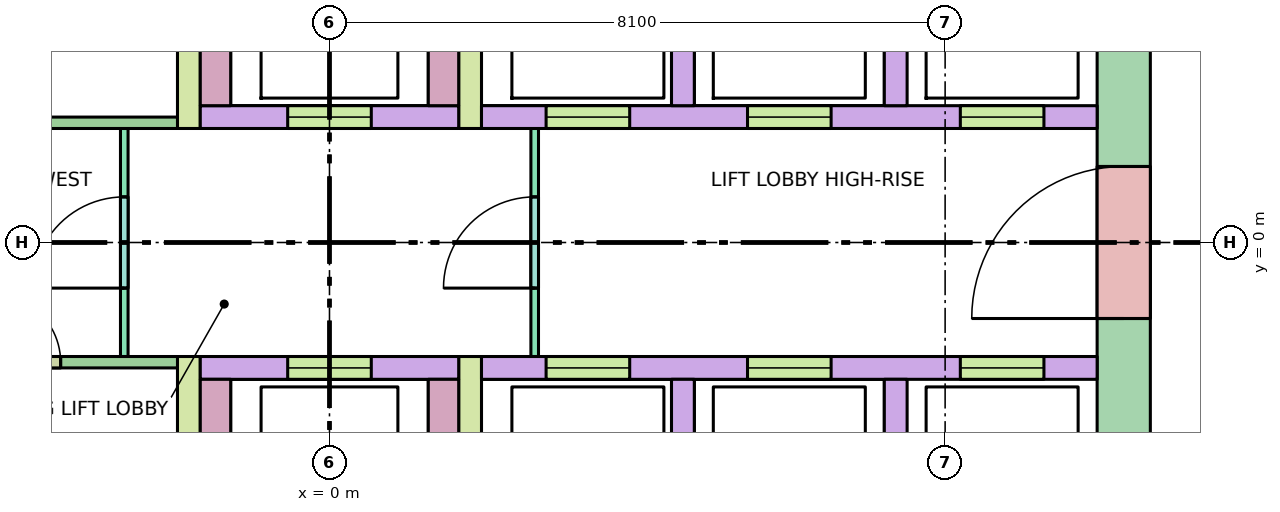
"""IFC4 building model, lengths in metres.
Left out: names, types, materials, properties, quantities, classifications, styles, units other than length and angle.
Written with IfcOpenShell. Run it as: python <this file> out.ifc"""

import sys

from ifc_helpers import new_model, si_unit, direction, frame, frame_2d, origin, place, context, subcontext, project, spatial, rectangle, extrude, element, fill, save


model = new_model("IFC4")
c1 = context("Model", 3, precision=1e-05, world=origin(), true_north=direction((0.0, 1.0)))
c2 = subcontext(c1, "Body", "Model", "MODEL_VIEW")
j1 = project(units=[si_unit("LENGTHUNIT", "METRE"), si_unit("PLANEANGLEUNIT", "RADIAN")], contexts=[c1])
p1 = place(None, origin())
s1 = spatial("IfcSite", under=j1, at=p1, CompositionType="ELEMENT")
p2 = place(p1, origin())
s2 = spatial("IfcBuilding", under=s1, at=p2, CompositionType="ELEMENT")
p3 = place(p2, frame((0.0, 0.0, 165.3)))
s3 = spatial("IfcBuildingStorey", under=s2, at=p3, CompositionType="ELEMENT", Elevation=165.3)
p4 = place(p3, frame((10.45, -5.13, -0.28), z_axis=(0.0, 0.0, 1.0), x_axis=(0.0, 1.0, 0.0)))
e1 = element("IfcWall", 1, at=p4, inside=s3, PredefinedType="SHEAR", context=c2, shape_type="SweptSolid", body=[
    extrude(rectangle(XDim=10.26, YDim=0.7, at=frame_2d((5.13, 0.0))), origin(), (0.0, 0.0, 1.0), 3.7),
])
p5 = place(p4, frame((4.13, 0.0, 0.28)))
e2 = element("IfcOpeningElement", 2, at=p5, cuts=e1, PredefinedType="OPENING", context=c2, shape_type="SweptSolid", body=[
    extrude(rectangle(XDim=2.0, YDim=2.1, at=frame_2d((1.0, 1.05))), frame((0.0, 0.36, 0.0), z_axis=(0.0, -1.0, 0.0), x_axis=(1.0, 0.0, 0.0)), (0.0, 0.0, 1.0), 0.72),
])
p6 = place(p3, frame((2.0, 1.65, 0.0), z_axis=(0.0, 0.0, 1.0), x_axis=(1.0, 0.0, 0.0)))
e3 = element("IfcWall", 3, at=p6, inside=s3, PredefinedType="SOLIDWALL", context=c2, shape_type="SweptSolid", body=[
    extrude(rectangle(XDim=8.1, YDim=0.3, at=frame_2d((4.05, 0.0))), origin(), (0.0, 0.0, 1.0), 3.42),
])
p7 = place(p6, frame((0.85, 0.0, 0.0)))
e4 = element("IfcOpeningElement", 4, at=p7, cuts=e3, PredefinedType="OPENING", context=c2, shape_type="SweptSolid", body=[
    extrude(rectangle(XDim=1.1, YDim=2.1, at=frame_2d((0.55, 1.05))), frame((0.0, 0.16, 0.0), z_axis=(0.0, -1.0, 0.0), x_axis=(1.0, 0.0, 0.0)), (0.0, 0.0, 1.0), 0.32),
])
p8 = place(p6, frame((3.5, 0.0, 0.0)))
e5 = element("IfcOpeningElement", 5, at=p8, cuts=e3, PredefinedType="OPENING", context=c2, shape_type="SweptSolid", body=[
    extrude(rectangle(XDim=1.1, YDim=2.1, at=frame_2d((0.55, 1.05))), frame((0.0, 0.16, 0.0), z_axis=(0.0, -1.0, 0.0), x_axis=(1.0, 0.0, 0.0)), (0.0, 0.0, 1.0), 0.32),
])
p9 = place(p6, frame((6.3, 0.0, 0.0)))
e6 = element("IfcOpeningElement", 6, at=p9, cuts=e3, PredefinedType="OPENING", context=c2, shape_type="SweptSolid", body=[
    extrude(rectangle(XDim=1.1, YDim=2.1, at=frame_2d((0.55, 1.05))), frame((0.0, 0.16, 0.0), z_axis=(0.0, -1.0, 0.0), x_axis=(1.0, 0.0, 0.0)), (0.0, 0.0, 1.0), 0.32),
])
p10 = place(p3, frame((2.0, -1.65, 0.0), z_axis=(0.0, 0.0, 1.0), x_axis=(1.0, 0.0, 0.0)))
e7 = element("IfcWall", 7, at=p10, inside=s3, PredefinedType="SOLIDWALL", context=c2, shape_type="SweptSolid", body=[
    extrude(rectangle(XDim=8.1, YDim=0.3, at=frame_2d((4.05, 0.0))), origin(), (0.0, 0.0, 1.0), 3.42),
])
p11 = place(p10, frame((0.85, 0.0, 0.0)))
e8 = element("IfcOpeningElement", 8, at=p11, cuts=e7, PredefinedType="OPENING", context=c2, shape_type="SweptSolid", body=[
    extrude(rectangle(XDim=1.1, YDim=2.1, at=frame_2d((0.55, 1.05))), frame((0.0, 0.16, 0.0), z_axis=(0.0, -1.0, 0.0), x_axis=(1.0, 0.0, 0.0)), (0.0, 0.0, 1.0), 0.32),
])
p12 = place(p10, frame((3.5, 0.0, 0.0)))
e9 = element("IfcOpeningElement", 9, at=p12, cuts=e7, PredefinedType="OPENING", context=c2, shape_type="SweptSolid", body=[
    extrude(rectangle(XDim=1.1, YDim=2.1, at=frame_2d((0.55, 1.05))), frame((0.0, 0.16, 0.0), z_axis=(0.0, -1.0, 0.0), x_axis=(1.0, 0.0, 0.0)), (0.0, 0.0, 1.0), 0.32),
])
p13 = place(p10, frame((6.3, 0.0, 0.0)))
e10 = element("IfcOpeningElement", 10, at=p13, cuts=e7, PredefinedType="OPENING", context=c2, shape_type="SweptSolid", body=[
    extrude(rectangle(XDim=1.1, YDim=2.1, at=frame_2d((0.55, 1.05))), frame((0.0, 0.16, 0.0), z_axis=(0.0, -1.0, 0.0), x_axis=(1.0, 0.0, 0.0)), (0.0, 0.0, 1.0), 0.32),
])
for number, where, z_axis, x_axis in (
    (11, (4.65, 1.8, 0.0), (0.0, 0.0, 1.0), (0.0, 1.0, 0.0)),
    (12, (4.65, -4.2, 0.0), (0.0, 0.0, 1.0), (0.0, 1.0, 0.0)),
    (13, (7.45, 1.8, 0.0), (0.0, 0.0, 1.0), (0.0, 1.0, 0.0)),
    (14, (7.45, -4.2, 0.0), (0.0, 0.0, 1.0), (0.0, 1.0, 0.0)),
):
    element("IfcWall", number, at=place(p3, frame(where, z_axis=z_axis, x_axis=x_axis)), inside=s3, PredefinedType="SOLIDWALL", context=c2, shape_type="SweptSolid", body=[
        extrude(rectangle(XDim=2.4, YDim=0.3, at=frame_2d((1.2, 0.0))), origin(), (0.0, 0.0, 1.0), 3.42),
    ])
for number, where, z_axis, x_axis in (
    (15, (-1.85, 1.5, 0.0), (0.0, 0.0, 1.0), (0.0, 1.0, 0.0)),
    (16, (-1.85, -8.1, 0.0), (0.0, 0.0, 1.0), (0.0, 1.0, 0.0)),
    (17, (1.85, 1.5, 0.0), (0.0, 0.0, 1.0), (0.0, 1.0, 0.0)),
    (18, (1.85, -8.1, 0.0), (0.0, 0.0, 1.0), (0.0, 1.0, 0.0)),
):
    element("IfcWall", number, at=place(p3, frame(where, z_axis=z_axis, x_axis=x_axis)), inside=s3, PredefinedType="SHEAR", context=c2, shape_type="SweptSolid", body=[
        extrude(rectangle(XDim=6.6, YDim=0.3, at=frame_2d((3.3, 0.0))), origin(), (0.0, 0.0, 1.0), 3.42),
    ])
p14 = place(p3, frame((-1.7, 1.65, 0.0), z_axis=(0.0, 0.0, 1.0), x_axis=(1.0, 0.0, 0.0)))
e19 = element("IfcWall", 19, at=p14, inside=s3, PredefinedType="SOLIDWALL", context=c2, shape_type="SweptSolid", body=[
    extrude(rectangle(XDim=3.4, YDim=0.3, at=frame_2d((1.7, 0.0))), origin(), (0.0, 0.0, 1.0), 3.42),
])
p15 = place(p14, frame((1.15, 0.0, 0.0)))
e20 = element("IfcOpeningElement", 20, at=p15, cuts=e19, PredefinedType="OPENING", context=c2, shape_type="SweptSolid", body=[
    extrude(rectangle(XDim=1.1, YDim=2.1, at=frame_2d((0.55, 1.05))), frame((0.0, 0.16, 0.0), z_axis=(0.0, -1.0, 0.0), x_axis=(1.0, 0.0, 0.0)), (0.0, 0.0, 1.0), 0.32),
])
p16 = place(p3, frame((-1.7, -1.65, 0.0), z_axis=(0.0, 0.0, 1.0), x_axis=(1.0, 0.0, 0.0)))
e21 = element("IfcWall", 21, at=p16, inside=s3, PredefinedType="SOLIDWALL", context=c2, shape_type="SweptSolid", body=[
    extrude(rectangle(XDim=3.4, YDim=0.3, at=frame_2d((1.7, 0.0))), origin(), (0.0, 0.0, 1.0), 3.42),
])
p17 = place(p16, frame((1.15, 0.0, 0.0)))
e22 = element("IfcOpeningElement", 22, at=p17, cuts=e21, PredefinedType="OPENING", context=c2, shape_type="SweptSolid", body=[
    extrude(rectangle(XDim=1.1, YDim=2.1, at=frame_2d((0.55, 1.05))), frame((0.0, 0.16, 0.0), z_axis=(0.0, -1.0, 0.0), x_axis=(1.0, 0.0, 0.0)), (0.0, 0.0, 1.0), 0.32),
])
for number, where, z_axis, x_axis in (
    (23, (-1.5, 1.8, 0.0), (0.0, 0.0, 1.0), (0.0, 1.0, 0.0)),
    (24, (-1.5, -4.8, 0.0), (0.0, 0.0, 1.0), (0.0, 1.0, 0.0)),
    (25, (1.5, 1.8, 0.0), (0.0, 0.0, 1.0), (0.0, 1.0, 0.0)),
    (26, (1.5, -4.8, 0.0), (0.0, 0.0, 1.0), (0.0, 1.0, 0.0)),
):
    element("IfcWall", number, at=place(p3, frame(where, z_axis=z_axis, x_axis=x_axis)), inside=s3, PredefinedType="SOLIDWALL", context=c2, shape_type="SweptSolid", body=[
        extrude(rectangle(XDim=3.0, YDim=0.4, at=frame_2d((1.5, 0.0))), origin(), (0.0, 0.0, 1.0), 3.42),
    ])
p18 = place(p3, frame((-2.7, -1.5, 0.0), z_axis=(0.0, 0.0, 1.0), x_axis=(0.0, 1.0, 0.0)))
e27 = element("IfcWall", 27, at=p18, inside=s3, PredefinedType="PARTITIONING", context=c2, shape_type="SweptSolid", body=[
    extrude(rectangle(XDim=3.0, YDim=0.1, at=frame_2d((1.5, 0.0))), origin(), (0.0, 0.0, 1.0), 3.42),
])
p19 = place(p18, frame((0.9, 0.0, 0.0)))
e28 = element("IfcOpeningElement", 28, at=p19, cuts=e27, PredefinedType="OPENING", context=c2, shape_type="SweptSolid", body=[
    extrude(rectangle(XDim=1.2, YDim=2.1, at=frame_2d((0.6, 1.05))), frame((0.0, 0.06, 0.0), z_axis=(0.0, -1.0, 0.0), x_axis=(1.0, 0.0, 0.0)), (0.0, 0.0, 1.0), 0.12),
])
p20 = place(p3, frame((2.7, -1.5, 0.0), z_axis=(0.0, 0.0, 1.0), x_axis=(0.0, 1.0, 0.0)))
e29 = element("IfcWall", 29, at=p20, inside=s3, PredefinedType="PARTITIONING", context=c2, shape_type="SweptSolid", body=[
    extrude(rectangle(XDim=3.0, YDim=0.1, at=frame_2d((1.5, 0.0))), origin(), (0.0, 0.0, 1.0), 3.42),
])
p21 = place(p20, frame((0.9, 0.0, 0.0)))
e30 = element("IfcOpeningElement", 30, at=p21, cuts=e29, PredefinedType="OPENING", context=c2, shape_type="SweptSolid", body=[
    extrude(rectangle(XDim=1.2, YDim=2.1, at=frame_2d((0.6, 1.05))), frame((0.0, 0.06, 0.0), z_axis=(0.0, -1.0, 0.0), x_axis=(1.0, 0.0, 0.0)), (0.0, 0.0, 1.0), 0.12),
])
p22 = place(p3, frame((-10.1, 1.575, 0.0), z_axis=(0.0, 0.0, 1.0), x_axis=(1.0, 0.0, 0.0)))
e31 = element("IfcWall", 31, at=p22, inside=s3, PredefinedType="PARTITIONING", context=c2, shape_type="SweptSolid", body=[
    extrude(rectangle(XDim=8.1, YDim=0.15, at=frame_2d((4.05, 0.0))), origin(), (0.0, 0.0, 1.0), 3.42),
])
p23 = place(p22, frame((0.33, 0.0, 0.0)))
e32 = element("IfcOpeningElement", 32, at=p23, cuts=e31, PredefinedType="OPENING", context=c2, shape_type="SweptSolid", body=[
    extrude(rectangle(XDim=0.9, YDim=2.1, at=frame_2d((0.45, 1.05))), frame((0.0, 0.085, 0.0), z_axis=(0.0, -1.0, 0.0), x_axis=(1.0, 0.0, 0.0)), (0.0, 0.0, 1.0), 0.17),
])
p24 = place(p22, frame((2.04, 0.0, 0.0)))
e33 = element("IfcOpeningElement", 33, at=p24, cuts=e31, PredefinedType="OPENING", context=c2, shape_type="SweptSolid", body=[
    extrude(rectangle(XDim=0.9, YDim=2.1, at=frame_2d((0.45, 1.05))), frame((0.0, 0.085, 0.0), z_axis=(0.0, -1.0, 0.0), x_axis=(1.0, 0.0, 0.0)), (0.0, 0.0, 1.0), 0.17),
])
p25 = place(p22, frame((5.31, 0.0, 0.0)))
e34 = element("IfcOpeningElement", 34, at=p25, cuts=e31, PredefinedType="OPENING", context=c2, shape_type="SweptSolid", body=[
    extrude(rectangle(XDim=0.9, YDim=2.1, at=frame_2d((0.45, 1.05))), frame((0.0, 0.085, 0.0), z_axis=(0.0, -1.0, 0.0), x_axis=(1.0, 0.0, 0.0)), (0.0, 0.0, 1.0), 0.17),
])
p26 = place(p3, frame((-10.1, -1.575, 0.0), z_axis=(0.0, 0.0, 1.0), x_axis=(1.0, 0.0, 0.0)))
e35 = element("IfcWall", 35, at=p26, inside=s3, PredefinedType="PARTITIONING", context=c2, shape_type="SweptSolid", body=[
    extrude(rectangle(XDim=8.1, YDim=0.15, at=frame_2d((4.05, 0.0))), origin(), (0.0, 0.0, 1.0), 3.42),
])
p27 = place(p26, frame((1.538, 0.0, 0.0)))
e36 = element("IfcOpeningElement", 36, at=p27, cuts=e35, PredefinedType="OPENING", context=c2, shape_type="SweptSolid", body=[
    extrude(rectangle(XDim=0.9, YDim=2.1, at=frame_2d((0.45, 1.05))), frame((0.0, 0.085, 0.0), z_axis=(0.0, -1.0, 0.0), x_axis=(1.0, 0.0, 0.0)), (0.0, 0.0, 1.0), 0.17),
])
p28 = place(p26, frame((5.663, 0.0, 0.0)))
e37 = element("IfcOpeningElement", 37, at=p28, cuts=e35, PredefinedType="OPENING", context=c2, shape_type="SweptSolid", body=[
    extrude(rectangle(XDim=0.9, YDim=2.1, at=frame_2d((0.45, 1.05))), frame((0.0, 0.085, 0.0), z_axis=(0.0, -1.0, 0.0), x_axis=(1.0, 0.0, 0.0)), (0.0, 0.0, 1.0), 0.17),
])
p29 = place(p7, origin())
e38 = element("IfcDoor", 38, at=p29, inside=s3, OperationType="DOUBLE_DOOR_SLIDING", PredefinedType="DOOR", context=c2, shape_type="SweptSolid", body=[
    extrude(rectangle(XDim=1.1, YDim=2.1, at=frame_2d((0.55, 1.05))), frame((0.0, 0.025, 0.0), z_axis=(0.0, -1.0, 0.0), x_axis=(1.0, 0.0, 0.0)), (0.0, 0.0, 1.0), 0.05),
])
fill(e4, e38)
p30 = place(p8, origin())
e39 = element("IfcDoor", 39, at=p30, inside=s3, OperationType="DOUBLE_DOOR_SLIDING", PredefinedType="DOOR", context=c2, shape_type="SweptSolid", body=[
    extrude(rectangle(XDim=1.1, YDim=2.1, at=frame_2d((0.55, 1.05))), frame((0.0, 0.025, 0.0), z_axis=(0.0, -1.0, 0.0), x_axis=(1.0, 0.0, 0.0)), (0.0, 0.0, 1.0), 0.05),
])
fill(e5, e39)
p31 = place(p9, origin())
e40 = element("IfcDoor", 40, at=p31, inside=s3, OperationType="DOUBLE_DOOR_SLIDING", PredefinedType="DOOR", context=c2, shape_type="SweptSolid", body=[
    extrude(rectangle(XDim=1.1, YDim=2.1, at=frame_2d((0.55, 1.05))), frame((0.0, 0.025, 0.0), z_axis=(0.0, -1.0, 0.0), x_axis=(1.0, 0.0, 0.0)), (0.0, 0.0, 1.0), 0.05),
])
fill(e6, e40)
p32 = place(p11, origin())
e41 = element("IfcDoor", 41, at=p32, inside=s3, OperationType="DOUBLE_DOOR_SLIDING", PredefinedType="DOOR", context=c2, shape_type="SweptSolid", body=[
    extrude(rectangle(XDim=1.1, YDim=2.1, at=frame_2d((0.55, 1.05))), frame((0.0, 0.025, 0.0), z_axis=(0.0, -1.0, 0.0), x_axis=(1.0, 0.0, 0.0)), (0.0, 0.0, 1.0), 0.05),
])
fill(e8, e41)
p33 = place(p12, origin())
e42 = element("IfcDoor", 42, at=p33, inside=s3, OperationType="DOUBLE_DOOR_SLIDING", PredefinedType="DOOR", context=c2, shape_type="SweptSolid", body=[
    extrude(rectangle(XDim=1.1, YDim=2.1, at=frame_2d((0.55, 1.05))), frame((0.0, 0.025, 0.0), z_axis=(0.0, -1.0, 0.0), x_axis=(1.0, 0.0, 0.0)), (0.0, 0.0, 1.0), 0.05),
])
fill(e9, e42)
p34 = place(p13, origin())
e43 = element("IfcDoor", 43, at=p34, inside=s3, OperationType="DOUBLE_DOOR_SLIDING", PredefinedType="DOOR", context=c2, shape_type="SweptSolid", body=[
    extrude(rectangle(XDim=1.1, YDim=2.1, at=frame_2d((0.55, 1.05))), frame((0.0, 0.025, 0.0), z_axis=(0.0, -1.0, 0.0), x_axis=(1.0, 0.0, 0.0)), (0.0, 0.0, 1.0), 0.05),
])
fill(e10, e43)
p35 = place(p15, origin())
e44 = element("IfcDoor", 44, at=p35, inside=s3, OperationType="DOUBLE_DOOR_SLIDING", PredefinedType="DOOR", context=c2, shape_type="SweptSolid", body=[
    extrude(rectangle(XDim=1.1, YDim=2.1, at=frame_2d((0.55, 1.05))), frame((0.0, 0.025, 0.0), z_axis=(0.0, -1.0, 0.0), x_axis=(1.0, 0.0, 0.0)), (0.0, 0.0, 1.0), 0.05),
])
fill(e20, e44)
p36 = place(p17, origin())
e45 = element("IfcDoor", 45, at=p36, inside=s3, OperationType="DOUBLE_DOOR_SLIDING", PredefinedType="DOOR", context=c2, shape_type="SweptSolid", body=[
    extrude(rectangle(XDim=1.1, YDim=2.1, at=frame_2d((0.55, 1.05))), frame((0.0, 0.025, 0.0), z_axis=(0.0, -1.0, 0.0), x_axis=(1.0, 0.0, 0.0)), (0.0, 0.0, 1.0), 0.05),
])
fill(e22, e45)
p37 = place(p5, origin())
e46 = element("IfcDoor", 46, at=p37, inside=s3, OperationType="DOUBLE_DOOR_SINGLE_SWING", PredefinedType="DOOR", context=c2, shape_type="SweptSolid", body=[
    extrude(rectangle(XDim=2.0, YDim=2.1, at=frame_2d((1.0, 1.05))), frame((0.0, 0.025, 0.0), z_axis=(0.0, -1.0, 0.0), x_axis=(1.0, 0.0, 0.0)), (0.0, 0.0, 1.0), 0.05),
])
fill(e2, e46)
p38 = place(p19, origin())
e47 = element("IfcDoor", 47, at=p38, inside=s3, OperationType="SINGLE_SWING_LEFT", PredefinedType="DOOR", context=c2, shape_type="SweptSolid", body=[
    extrude(rectangle(XDim=1.2, YDim=2.1, at=frame_2d((0.6, 1.05))), frame((0.0, 0.025, 0.0), z_axis=(0.0, -1.0, 0.0), x_axis=(1.0, 0.0, 0.0)), (0.0, 0.0, 1.0), 0.05),
])
fill(e28, e47)
p39 = place(p21, origin())
e48 = element("IfcDoor", 48, at=p39, inside=s3, OperationType="SINGLE_SWING_LEFT", PredefinedType="DOOR", context=c2, shape_type="SweptSolid", body=[
    extrude(rectangle(XDim=1.2, YDim=2.1, at=frame_2d((0.6, 1.05))), frame((0.0, 0.025, 0.0), z_axis=(0.0, -1.0, 0.0), x_axis=(1.0, 0.0, 0.0)), (0.0, 0.0, 1.0), 0.05),
])
fill(e30, e48)
p40 = place(p28, origin())
e49 = element("IfcDoor", 49, at=p40, inside=s3, OperationType="SINGLE_SWING_LEFT", PredefinedType="DOOR", context=c2, shape_type="SweptSolid", body=[
    extrude(rectangle(XDim=0.9, YDim=2.1, at=frame_2d((0.45, 1.05))), frame((0.0, 0.025, 0.0), z_axis=(0.0, -1.0, 0.0), x_axis=(1.0, 0.0, 0.0)), (0.0, 0.0, 1.0), 0.05),
])
fill(e37, e49)
save(model, sys.argv[1])
